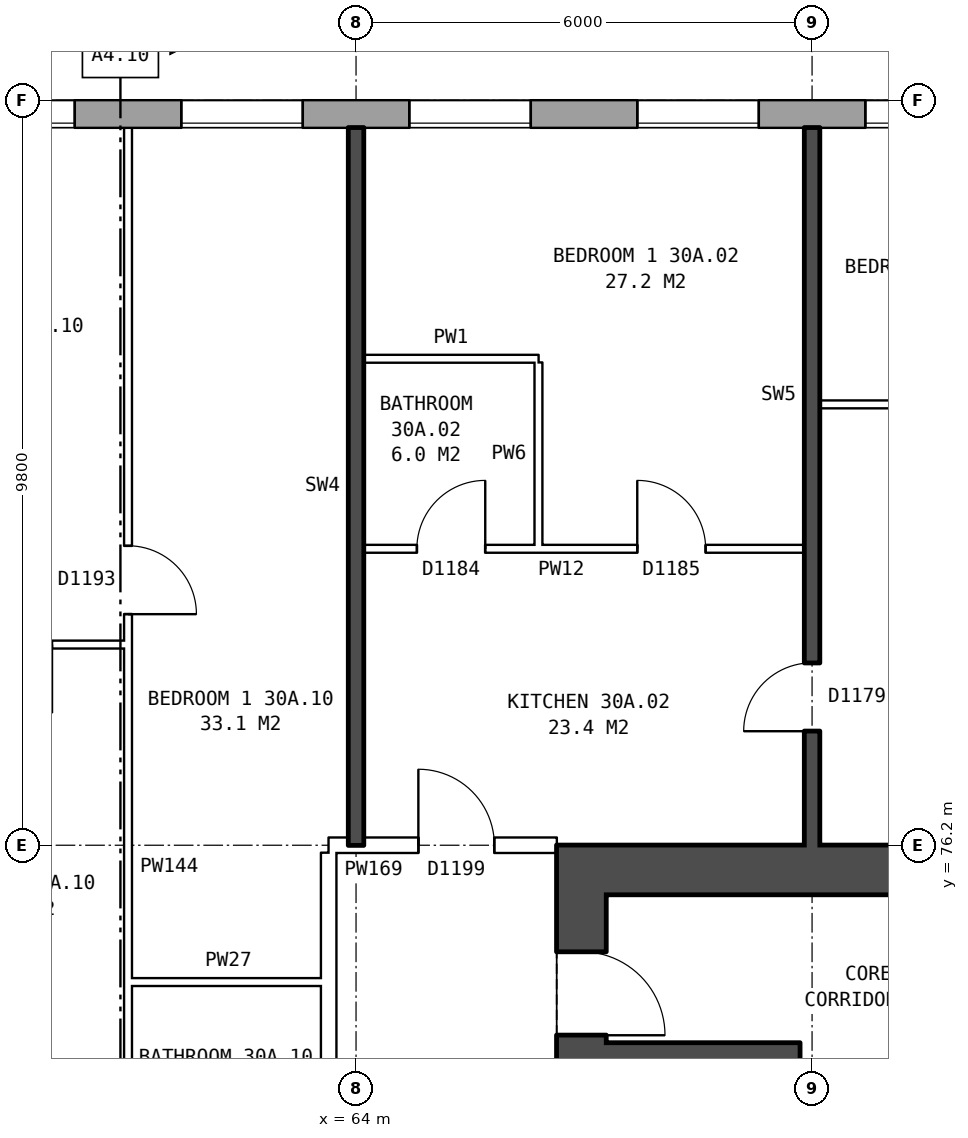
"""IFC4 building model, lengths in metres.
Left out: names, types, materials, properties, quantities, classifications, styles, units other than length and angle.
Written with IfcOpenShell. Run it as: python <this file> out.ifc"""

import sys

from ifc_helpers import new_model, si_unit, direction, frame, frame_2d, origin, place, context, subcontext, project, spatial, rectangle, extrude, element, fill, save


model = new_model("IFC4")
c1 = context("Model", 3, precision=1e-05, world=origin(), true_north=direction((0.0, 1.0)))
c2 = subcontext(c1, "Body", "Model", "MODEL_VIEW")
j1 = project(units=[si_unit("LENGTHUNIT", "METRE"), si_unit("PLANEANGLEUNIT", "RADIAN")], contexts=[c1])
p1 = place(None, origin())
s1 = spatial("IfcSite", under=j1, at=p1, CompositionType="ELEMENT")
p2 = place(p1, origin())
s2 = spatial("IfcBuilding", under=s1, at=p2, CompositionType="ELEMENT")
p3 = place(p2, frame((0.0, 0.0, 108.8)))
s3 = spatial("IfcBuildingStorey", under=s2, at=p3, CompositionType="ELEMENT", Elevation=108.8)
p4 = place(p3, frame((72.925, 85.82, 0.0), z_axis=(0.0, 0.0, 1.0), x_axis=(-1.0, 0.0, 0.0)))
e1 = element("IfcWall", 1, at=p4, inside=s3, PredefinedType="STANDARD", context=c2, shape_type="SweptSolid", body=[
    extrude(rectangle(XDim=44.851, YDim=0.36, at=frame_2d((22.425, 0.0))), origin(), (0.0, 0.0, 1.0), 2.85),
])
p5 = place(p4, frame((0.625, 0.0, 0.8)))
e2 = element("IfcOpeningElement", 2, at=p5, cuts=e1, PredefinedType="OPENING", context=c2, shape_type="SweptSolid", body=[
    extrude(rectangle(XDim=1.6, YDim=1.8, at=frame_2d((0.8, 0.9))), frame((0.0, 0.19, 0.0), z_axis=(0.0, -1.0, 0.0), x_axis=(1.0, 0.0, 0.0)), (0.0, 0.0, 1.0), 0.38),
])
p6 = place(p4, frame((3.625, 0.0, 0.8)))
e3 = element("IfcOpeningElement", 3, at=p6, cuts=e1, PredefinedType="OPENING", context=c2, shape_type="SweptSolid", body=[
    extrude(rectangle(XDim=1.6, YDim=1.8, at=frame_2d((0.8, 0.9))), frame((0.0, 0.19, 0.0), z_axis=(0.0, -1.0, 0.0), x_axis=(1.0, 0.0, 0.0)), (0.0, 0.0, 1.0), 0.38),
])
p7 = place(p4, frame((6.625, 0.0, 0.8)))
e4 = element("IfcOpeningElement", 4, at=p7, cuts=e1, PredefinedType="OPENING", context=c2, shape_type="SweptSolid", body=[
    extrude(rectangle(XDim=1.6, YDim=1.8, at=frame_2d((0.8, 0.9))), frame((0.0, 0.19, 0.0), z_axis=(0.0, -1.0, 0.0), x_axis=(1.0, 0.0, 0.0)), (0.0, 0.0, 1.0), 0.38),
])
p8 = place(p4, frame((9.625, 0.0, 0.8)))
e5 = element("IfcOpeningElement", 5, at=p8, cuts=e1, PredefinedType="OPENING", context=c2, shape_type="SweptSolid", body=[
    extrude(rectangle(XDim=1.6, YDim=1.8, at=frame_2d((0.8, 0.9))), frame((0.0, 0.19, 0.0), z_axis=(0.0, -1.0, 0.0), x_axis=(1.0, 0.0, 0.0)), (0.0, 0.0, 1.0), 0.38),
])
p9 = place(p4, frame((12.625, 0.0, 0.8)))
e6 = element("IfcOpeningElement", 6, at=p9, cuts=e1, PredefinedType="OPENING", context=c2, shape_type="SweptSolid", body=[
    extrude(rectangle(XDim=1.6, YDim=1.8, at=frame_2d((0.8, 0.9))), frame((0.0, 0.19, 0.0), z_axis=(0.0, -1.0, 0.0), x_axis=(1.0, 0.0, 0.0)), (0.0, 0.0, 1.0), 0.38),
])
p10 = place(p4, frame((15.125, 0.0, 1.65)))
e7 = element("IfcOpeningElement", 7, at=p10, cuts=e1, PredefinedType="OPENING", context=c2, shape_type="SweptSolid", body=[
    extrude(rectangle(XDim=1.0, YDim=0.9, at=frame_2d((0.5, 0.45))), frame((0.0, 0.19, 0.0), z_axis=(0.0, -1.0, 0.0), x_axis=(1.0, 0.0, 0.0)), (0.0, 0.0, 1.0), 0.38),
])
p11 = place(p4, frame((18.625, 0.0, 0.8)))
e8 = element("IfcOpeningElement", 8, at=p11, cuts=e1, PredefinedType="OPENING", context=c2, shape_type="SweptSolid", body=[
    extrude(rectangle(XDim=1.6, YDim=1.8, at=frame_2d((0.8, 0.9))), frame((0.0, 0.19, 0.0), z_axis=(0.0, -1.0, 0.0), x_axis=(1.0, 0.0, 0.0)), (0.0, 0.0, 1.0), 0.38),
])
p12 = place(p4, frame((21.625, 0.0, 0.8)))
e9 = element("IfcOpeningElement", 9, at=p12, cuts=e1, PredefinedType="OPENING", context=c2, shape_type="SweptSolid", body=[
    extrude(rectangle(XDim=1.6, YDim=1.8, at=frame_2d((0.8, 0.9))), frame((0.0, 0.19, 0.0), z_axis=(0.0, -1.0, 0.0), x_axis=(1.0, 0.0, 0.0)), (0.0, 0.0, 1.0), 0.38),
])
p13 = place(p4, frame((24.625, 0.0, 0.8)))
e10 = element("IfcOpeningElement", 10, at=p13, cuts=e1, PredefinedType="OPENING", context=c2, shape_type="SweptSolid", body=[
    extrude(rectangle(XDim=1.6, YDim=1.8, at=frame_2d((0.8, 0.9))), frame((0.0, 0.19, 0.0), z_axis=(0.0, -1.0, 0.0), x_axis=(1.0, 0.0, 0.0)), (0.0, 0.0, 1.0), 0.38),
])
p14 = place(p4, frame((29.075, 0.0, 1.4)))
e11 = element("IfcOpeningElement", 11, at=p14, cuts=e1, PredefinedType="OPENING", context=c2, shape_type="SweptSolid", body=[
    extrude(rectangle(XDim=1.2, YDim=1.2, at=frame_2d((0.6, 0.6))), frame((0.0, 0.19, 0.0), z_axis=(0.0, -1.0, 0.0), x_axis=(1.0, 0.0, 0.0)), (0.0, 0.0, 1.0), 0.38),
])
p15 = place(p4, frame((30.625, 0.0, 0.8)))
e12 = element("IfcOpeningElement", 12, at=p15, cuts=e1, PredefinedType="OPENING", context=c2, shape_type="SweptSolid", body=[
    extrude(rectangle(XDim=1.6, YDim=1.8, at=frame_2d((0.8, 0.9))), frame((0.0, 0.19, 0.0), z_axis=(0.0, -1.0, 0.0), x_axis=(1.0, 0.0, 0.0)), (0.0, 0.0, 1.0), 0.38),
])
p16 = place(p4, frame((33.625, 0.0, 0.8)))
e13 = element("IfcOpeningElement", 13, at=p16, cuts=e1, PredefinedType="OPENING", context=c2, shape_type="SweptSolid", body=[
    extrude(rectangle(XDim=1.6, YDim=1.8, at=frame_2d((0.8, 0.9))), frame((0.0, 0.19, 0.0), z_axis=(0.0, -1.0, 0.0), x_axis=(1.0, 0.0, 0.0)), (0.0, 0.0, 1.0), 0.38),
])
p17 = place(p4, frame((36.625, 0.0, 0.8)))
e14 = element("IfcOpeningElement", 14, at=p17, cuts=e1, PredefinedType="OPENING", context=c2, shape_type="SweptSolid", body=[
    extrude(rectangle(XDim=1.6, YDim=1.8, at=frame_2d((0.8, 0.9))), frame((0.0, 0.19, 0.0), z_axis=(0.0, -1.0, 0.0), x_axis=(1.0, 0.0, 0.0)), (0.0, 0.0, 1.0), 0.38),
])
p18 = place(p4, frame((39.625, 0.0, 0.8)))
e15 = element("IfcOpeningElement", 15, at=p18, cuts=e1, PredefinedType="OPENING", context=c2, shape_type="SweptSolid", body=[
    extrude(rectangle(XDim=1.6, YDim=1.8, at=frame_2d((0.8, 0.9))), frame((0.0, 0.19, 0.0), z_axis=(0.0, -1.0, 0.0), x_axis=(1.0, 0.0, 0.0)), (0.0, 0.0, 1.0), 0.38),
])
p19 = place(p4, frame((42.625, 0.0, 0.8)))
e16 = element("IfcOpeningElement", 16, at=p19, cuts=e1, PredefinedType="OPENING", context=c2, shape_type="SweptSolid", body=[
    extrude(rectangle(XDim=1.6, YDim=1.8, at=frame_2d((0.8, 0.9))), frame((0.0, 0.19, 0.0), z_axis=(0.0, -1.0, 0.0), x_axis=(1.0, 0.0, 0.0)), (0.0, 0.0, 1.0), 0.38),
])
p20 = place(p4, frame((16.525, 0.0, 0.15)))
e17 = element("IfcOpeningElement", 17, at=p20, cuts=e1, PredefinedType="OPENING", context=c2, shape_type="SweptSolid", body=[
    extrude(rectangle(XDim=1.2, YDim=0.9, at=frame_2d((0.6, 0.45))), frame((0.0, 0.19, 0.0), z_axis=(0.0, -1.0, 0.0), x_axis=(1.0, 0.0, 0.0)), (0.0, 0.0, 1.0), 0.38),
])
p21 = place(p3, frame((66.965, 64.45, 0.0), z_axis=(0.0, 0.0, 1.0), x_axis=(0.0, 1.0, 0.0)))
e18 = element("IfcWall", 18, at=p21, inside=s3, PredefinedType="SHEAR", context=c2, shape_type="SweptSolid", body=[
    extrude(rectangle(XDim=11.1, YDim=0.65, at=frame_2d((5.55, 0.0))), origin(), (0.0, 0.0, 1.0), 2.85),
])
p22 = place(p21, frame((0.675, 0.0, 0.0)))
e19 = element("IfcOpeningElement", 19, at=p22, cuts=e18, PredefinedType="OPENING", context=c2, shape_type="SweptSolid", body=[
    extrude(rectangle(XDim=1.1, YDim=2.1, at=frame_2d((0.55, 1.05))), frame((0.0, 0.335, 0.0), z_axis=(0.0, -1.0, 0.0), x_axis=(1.0, 0.0, 0.0)), (0.0, 0.0, 1.0), 0.67),
])
p23 = place(p21, frame((9.25, 0.0, 0.0)))
e20 = element("IfcOpeningElement", 20, at=p23, cuts=e18, PredefinedType="OPENING", context=c2, shape_type="SweptSolid", body=[
    extrude(rectangle(XDim=1.1, YDim=2.1, at=frame_2d((0.55, 1.05))), frame((0.0, 0.335, 0.0), z_axis=(0.0, -1.0, 0.0), x_axis=(1.0, 0.0, 0.0)), (0.0, 0.0, 1.0), 0.67),
])
p24 = place(p3, frame((66.64, 75.875, 0.0), z_axis=(0.0, 0.0, 1.0), x_axis=(1.0, 0.0, 0.0)))
e21 = element("IfcWall", 21, at=p24, inside=s3, PredefinedType="SHEAR", context=c2, shape_type="SweptSolid", body=[
    extrude(rectangle(XDim=9.0, YDim=0.65, at=frame_2d((4.5, 0.0))), origin(), (0.0, 0.0, 1.0), 2.85),
])
p25 = place(p3, frame((67.29, 73.45, 0.0), z_axis=(0.0, 0.0, 1.0), x_axis=(1.0, 0.0, 0.0)))
e22 = element("IfcWall", 22, at=p25, inside=s3, PredefinedType="SHEAR", context=c2, shape_type="SweptSolid", body=[
    extrude(rectangle(XDim=2.25, YDim=0.3, at=frame_2d((1.125, 0.0))), origin(), (0.0, 0.0, 1.0), 2.85),
])
p26 = place(p3, frame((69.69, 67.0, 0.0), z_axis=(0.0, 0.0, 1.0), x_axis=(0.0, 1.0, 0.0)))
e23 = element("IfcWall", 23, at=p26, inside=s3, PredefinedType="SHEAR", context=c2, shape_type="SweptSolid", body=[
    extrude(rectangle(XDim=6.6, YDim=0.3, at=frame_2d((3.3, 0.0))), origin(), (0.0, 0.0, 1.0), 2.85),
])
p27 = place(p3, frame((63.64, 63.9, 0.0), z_axis=(0.0, 0.0, 1.0), x_axis=(0.0, 1.0, 0.0)))
e24 = element("IfcWall", 24, at=p27, inside=s3, PredefinedType="PARTITIONING", context=c2, shape_type="SweptSolid", body=[
    extrude(rectangle(XDim=12.2, YDim=0.2, at=frame_2d((6.1, 0.0))), origin(), (0.0, 0.0, 1.0), 2.85),
])
p28 = place(p27, frame((5.1, 0.0, 0.0)))
e25 = element("IfcOpeningElement", 25, at=p28, cuts=e24, PredefinedType="OPENING", context=c2, shape_type="SweptSolid", body=[
    extrude(rectangle(XDim=2.0, YDim=2.1, at=frame_2d((1.0, 1.05))), frame((0.0, 0.11, 0.0), z_axis=(0.0, -1.0, 0.0), x_axis=(1.0, 0.0, 0.0)), (0.0, 0.0, 1.0), 0.22),
])
p29 = place(p3, frame((61.0, 74.4, 0.0), z_axis=(0.0, 0.0, 1.0), x_axis=(1.0, 0.0, 0.0)))
e26 = element("IfcWall", 26, at=p29, inside=s3, PredefinedType="PARTITIONING", context=c2, shape_type="SweptSolid", body=[
    extrude(rectangle(XDim=2.64, YDim=0.1, at=frame_2d((1.32, 0.0))), origin(), (0.0, 0.0, 1.0), 2.85),
])
p30 = place(p3, frame((63.64, 76.2, 0.0), z_axis=(0.0, 0.0, 1.0), x_axis=(1.0, 0.0, 0.0)))
e27 = element("IfcWall", 27, at=p30, inside=s3, PredefinedType="PARTITIONING", context=c2, shape_type="SweptSolid", body=[
    extrude(rectangle(XDim=3.0, YDim=0.2, at=frame_2d((1.5, 0.0))), origin(), (0.0, 0.0, 1.0), 2.85),
])
p31 = place(p30, frame((1.18, 0.0, 0.0)))
e28 = element("IfcOpeningElement", 28, at=p31, cuts=e27, PredefinedType="OPENING", context=c2, shape_type="SweptSolid", body=[
    extrude(rectangle(XDim=1.0, YDim=2.1, at=frame_2d((0.5, 1.05))), frame((0.0, 0.11, 0.0), z_axis=(0.0, -1.0, 0.0), x_axis=(1.0, 0.0, 0.0)), (0.0, 0.0, 1.0), 0.22),
])
p32 = place(p3, frame((58.1, 78.84, 0.0), z_axis=(0.0, 0.0, 1.0), x_axis=(1.0, 0.0, 0.0)))
e29 = element("IfcWall", 29, at=p32, inside=s3, PredefinedType="PARTITIONING", context=c2, shape_type="SweptSolid", body=[
    extrude(rectangle(XDim=2.9, YDim=0.1, at=frame_2d((1.45, 0.0))), origin(), (0.0, 0.0, 1.0), 2.85),
])
p33 = place(p32, frame((1.0, 0.0, 0.0)))
e30 = element("IfcOpeningElement", 30, at=p33, cuts=e29, PredefinedType="OPENING", context=c2, shape_type="SweptSolid", body=[
    extrude(rectangle(XDim=0.9, YDim=2.1, at=frame_2d((0.45, 1.05))), frame((0.0, 0.06, 0.0), z_axis=(0.0, -1.0, 0.0), x_axis=(1.0, 0.0, 0.0)), (0.0, 0.0, 1.0), 0.12),
])
p34 = place(p3, frame((64.1, 80.1, 0.0), z_axis=(0.0, 0.0, 1.0), x_axis=(1.0, 0.0, 0.0)))
e31 = element("IfcWall", 31, at=p34, inside=s3, PredefinedType="PARTITIONING", context=c2, shape_type="SweptSolid", body=[
    extrude(rectangle(XDim=5.8, YDim=0.1, at=frame_2d((2.9, 0.0))), origin(), (0.0, 0.0, 1.0), 2.85),
])
p35 = place(p34, frame((3.6, 0.0, 0.0)))
e32 = element("IfcOpeningElement", 32, at=p35, cuts=e31, PredefinedType="OPENING", context=c2, shape_type="SweptSolid", body=[
    extrude(rectangle(XDim=0.9, YDim=2.1, at=frame_2d((0.45, 1.05))), frame((0.0, 0.06, 0.0), z_axis=(0.0, -1.0, 0.0), x_axis=(1.0, 0.0, 0.0)), (0.0, 0.0, 1.0), 0.12),
])
p36 = place(p34, frame((0.7, 0.0, 0.0)))
e33 = element("IfcOpeningElement", 33, at=p36, cuts=e31, PredefinedType="OPENING", context=c2, shape_type="SweptSolid", body=[
    extrude(rectangle(XDim=0.9, YDim=2.1, at=frame_2d((0.45, 1.05))), frame((0.0, 0.06, 0.0), z_axis=(0.0, -1.0, 0.0), x_axis=(1.0, 0.0, 0.0)), (0.0, 0.0, 1.0), 0.12),
])
p37 = place(p3, frame((70.1, 82.0, 0.0), z_axis=(0.0, 0.0, 1.0), x_axis=(1.0, 0.0, 0.0)))
e34 = element("IfcWall", 34, at=p37, inside=s3, PredefinedType="PARTITIONING", context=c2, shape_type="SweptSolid", body=[
    extrude(rectangle(XDim=5.54, YDim=0.1, at=frame_2d((2.77, 0.0))), origin(), (0.0, 0.0, 1.0), 2.85),
])
p38 = place(p37, frame((2.32, 0.0, 0.0)))
e35 = element("IfcOpeningElement", 35, at=p38, cuts=e34, PredefinedType="OPENING", context=c2, shape_type="SweptSolid", body=[
    extrude(rectangle(XDim=0.9, YDim=2.1, at=frame_2d((0.45, 1.05))), frame((0.0, 0.06, 0.0), z_axis=(0.0, -1.0, 0.0), x_axis=(1.0, 0.0, 0.0)), (0.0, 0.0, 1.0), 0.12),
])
p39 = place(p3, frame((64.1, 82.6, 0.0), z_axis=(0.0, 0.0, 1.0), x_axis=(1.0, 0.0, 0.0)))
e36 = element("IfcWall", 36, at=p39, inside=s3, PredefinedType="PARTITIONING", context=c2, shape_type="SweptSolid", body=[
    extrude(rectangle(XDim=2.3, YDim=0.1, at=frame_2d((1.15, 0.0))), origin(), (0.0, 0.0, 1.0), 2.85),
])
p40 = place(p3, frame((61.0, 71.3, 0.0), z_axis=(0.0, 0.0, 1.0), x_axis=(0.0, 1.0, 0.0)))
e37 = element("IfcWall", 37, at=p40, inside=s3, PredefinedType="PARTITIONING", context=c2, shape_type="SweptSolid", body=[
    extrude(rectangle(XDim=14.34, YDim=0.1, at=frame_2d((7.17, 0.0))), origin(), (0.0, 0.0, 1.0), 2.85),
])
p41 = place(p40, frame((7.94, 0.0, 0.0)))
e38 = element("IfcOpeningElement", 38, at=p41, cuts=e37, PredefinedType="OPENING", context=c2, shape_type="SweptSolid", body=[
    extrude(rectangle(XDim=0.9, YDim=2.1, at=frame_2d((0.45, 1.05))), frame((0.0, 0.06, 0.0), z_axis=(0.0, -1.0, 0.0), x_axis=(1.0, 0.0, 0.0)), (0.0, 0.0, 1.0), 0.12),
])
p42 = place(p40, frame((0.4, 0.0, 0.0)))
e39 = element("IfcOpeningElement", 39, at=p42, cuts=e37, PredefinedType="OPENING", context=c2, shape_type="SweptSolid", body=[
    extrude(rectangle(XDim=0.9, YDim=2.1, at=frame_2d((0.45, 1.05))), frame((0.0, 0.06, 0.0), z_axis=(0.0, -1.0, 0.0), x_axis=(1.0, 0.0, 0.0)), (0.0, 0.0, 1.0), 0.12),
])
p43 = place(p3, frame((64.0, 76.2, 0.0), z_axis=(0.0, 0.0, 1.0), x_axis=(0.0, 1.0, 0.0)))
e40 = element("IfcWall", 40, at=p43, inside=s3, PredefinedType="SOLIDWALL", context=c2, shape_type="SweptSolid", body=[
    extrude(rectangle(XDim=9.44, YDim=0.2, at=frame_2d((4.72, 0.0))), origin(), (0.0, 0.0, 1.0), 2.85),
])
p44 = place(p3, frame((66.4, 80.15, 0.0), z_axis=(0.0, 0.0, 1.0), x_axis=(0.0, 1.0, 0.0)))
e41 = element("IfcWall", 41, at=p44, inside=s3, PredefinedType="PARTITIONING", context=c2, shape_type="SweptSolid", body=[
    extrude(rectangle(XDim=2.4, YDim=0.1, at=frame_2d((1.2, 0.0))), origin(), (0.0, 0.0, 1.0), 2.85),
])
p45 = place(p3, frame((70.0, 76.2, 0.0), z_axis=(0.0, 0.0, 1.0), x_axis=(0.0, 1.0, 0.0)))
e42 = element("IfcWall", 42, at=p45, inside=s3, PredefinedType="SOLIDWALL", context=c2, shape_type="SweptSolid", body=[
    extrude(rectangle(XDim=9.44, YDim=0.2, at=frame_2d((4.72, 0.0))), origin(), (0.0, 0.0, 1.0), 2.85),
])
p46 = place(p45, frame((1.5, 0.0, 0.0)))
e43 = element("IfcOpeningElement", 43, at=p46, cuts=e42, PredefinedType="OPENING", context=c2, shape_type="SweptSolid", body=[
    extrude(rectangle(XDim=0.9, YDim=2.1, at=frame_2d((0.45, 1.05))), frame((0.0, 0.11, 0.0), z_axis=(0.0, -1.0, 0.0), x_axis=(1.0, 0.0, 0.0)), (0.0, 0.0, 1.0), 0.22),
])
p47 = place(p5, origin())
e44 = element("IfcWindow", 44, at=p47, inside=s3, PartitioningType="SINGLE_PANEL", PredefinedType="WINDOW", context=c2, shape_type="SweptSolid", body=[
    extrude(rectangle(XDim=1.6, YDim=1.8, at=frame_2d((0.8, 0.9))), frame((0.0, 0.15, 0.0), z_axis=(0.0, -1.0, 0.0), x_axis=(1.0, 0.0, 0.0)), (0.0, 0.0, 1.0), 0.06),
])
fill(e2, e44)
p48 = place(p6, origin())
e45 = element("IfcWindow", 45, at=p48, inside=s3, PartitioningType="SINGLE_PANEL", PredefinedType="WINDOW", context=c2, shape_type="SweptSolid", body=[
    extrude(rectangle(XDim=1.6, YDim=1.8, at=frame_2d((0.8, 0.9))), frame((0.0, 0.15, 0.0), z_axis=(0.0, -1.0, 0.0), x_axis=(1.0, 0.0, 0.0)), (0.0, 0.0, 1.0), 0.06),
])
fill(e3, e45)
p49 = place(p7, origin())
e46 = element("IfcWindow", 46, at=p49, inside=s3, PartitioningType="SINGLE_PANEL", PredefinedType="WINDOW", context=c2, shape_type="SweptSolid", body=[
    extrude(rectangle(XDim=1.6, YDim=1.8, at=frame_2d((0.8, 0.9))), frame((0.0, 0.15, 0.0), z_axis=(0.0, -1.0, 0.0), x_axis=(1.0, 0.0, 0.0)), (0.0, 0.0, 1.0), 0.06),
])
fill(e4, e46)
p50 = place(p8, origin())
e47 = element("IfcWindow", 47, at=p50, inside=s3, PartitioningType="SINGLE_PANEL", PredefinedType="WINDOW", context=c2, shape_type="SweptSolid", body=[
    extrude(rectangle(XDim=1.6, YDim=1.8, at=frame_2d((0.8, 0.9))), frame((0.0, 0.15, 0.0), z_axis=(0.0, -1.0, 0.0), x_axis=(1.0, 0.0, 0.0)), (0.0, 0.0, 1.0), 0.06),
])
fill(e5, e47)
p51 = place(p9, origin())
e48 = element("IfcWindow", 48, at=p51, inside=s3, PartitioningType="SINGLE_PANEL", PredefinedType="WINDOW", context=c2, shape_type="SweptSolid", body=[
    extrude(rectangle(XDim=1.6, YDim=1.8, at=frame_2d((0.8, 0.9))), frame((0.0, 0.15, 0.0), z_axis=(0.0, -1.0, 0.0), x_axis=(1.0, 0.0, 0.0)), (0.0, 0.0, 1.0), 0.06),
])
fill(e6, e48)
p52 = place(p23, frame((1.1, 0.0, 0.0), z_axis=(0.0, 0.0, 1.0), x_axis=(-1.0, 0.0, 0.0)))
e49 = element("IfcDoor", 49, at=p52, inside=s3, OperationType="SINGLE_SWING_RIGHT", PredefinedType="DOOR", context=c2, shape_type="SweptSolid", body=[
    extrude(rectangle(XDim=1.1, YDim=2.1, at=frame_2d((0.55, 1.05))), frame((0.0, 0.31, 0.0), z_axis=(0.0, -1.0, 0.0), x_axis=(1.0, 0.0, 0.0)), (0.0, 0.0, 1.0), 0.05),
])
fill(e20, e49)
p53 = place(p35, origin())
e50 = element("IfcDoor", 50, at=p53, inside=s3, OperationType="SINGLE_SWING_LEFT", PredefinedType="DOOR", context=c2, shape_type="SweptSolid", body=[
    extrude(rectangle(XDim=0.9, YDim=2.1, at=frame_2d((0.45, 1.05))), frame((0.0, 0.025, 0.0), z_axis=(0.0, -1.0, 0.0), x_axis=(1.0, 0.0, 0.0)), (0.0, 0.0, 1.0), 0.05),
])
fill(e32, e50)
p54 = place(p31, origin())
e51 = element("IfcDoor", 51, at=p54, inside=s3, OperationType="SINGLE_SWING_LEFT", PredefinedType="DOOR", context=c2, shape_type="SweptSolid", body=[
    extrude(rectangle(XDim=1.0, YDim=2.1, at=frame_2d((0.5, 1.05))), frame((0.0, 0.025, 0.0), z_axis=(0.0, -1.0, 0.0), x_axis=(1.0, 0.0, 0.0)), (0.0, 0.0, 1.0), 0.05),
])
fill(e28, e51)
p55 = place(p46, origin())
e52 = element("IfcDoor", 52, at=p55, inside=s3, OperationType="SINGLE_SWING_LEFT", PredefinedType="DOOR", context=c2, shape_type="SweptSolid", body=[
    extrude(rectangle(XDim=0.9, YDim=2.1, at=frame_2d((0.45, 1.05))), frame((0.0, 0.025, 0.0), z_axis=(0.0, -1.0, 0.0), x_axis=(1.0, 0.0, 0.0)), (0.0, 0.0, 1.0), 0.05),
])
fill(e43, e52)
p56 = place(p36, origin())
e53 = element("IfcDoor", 53, at=p56, inside=s3, OperationType="SINGLE_SWING_RIGHT", PredefinedType="DOOR", context=c2, shape_type="SweptSolid", body=[
    extrude(rectangle(XDim=0.9, YDim=2.1, at=frame_2d((0.45, 1.05))), frame((0.0, 0.025, 0.0), z_axis=(0.0, -1.0, 0.0), x_axis=(1.0, 0.0, 0.0)), (0.0, 0.0, 1.0), 0.05),
])
fill(e33, e53)
p57 = place(p41, frame((0.9, 0.0, 0.0), z_axis=(0.0, 0.0, 1.0), x_axis=(-1.0, 0.0, 0.0)))
e54 = element("IfcDoor", 54, at=p57, inside=s3, OperationType="SINGLE_SWING_RIGHT", PredefinedType="DOOR", context=c2, shape_type="SweptSolid", body=[
    extrude(rectangle(XDim=0.9, YDim=2.1, at=frame_2d((0.45, 1.05))), frame((0.0, 0.025, 0.0), z_axis=(0.0, -1.0, 0.0), x_axis=(1.0, 0.0, 0.0)), (0.0, 0.0, 1.0), 0.05),
])
fill(e38, e54)
save(model, sys.argv[1])
